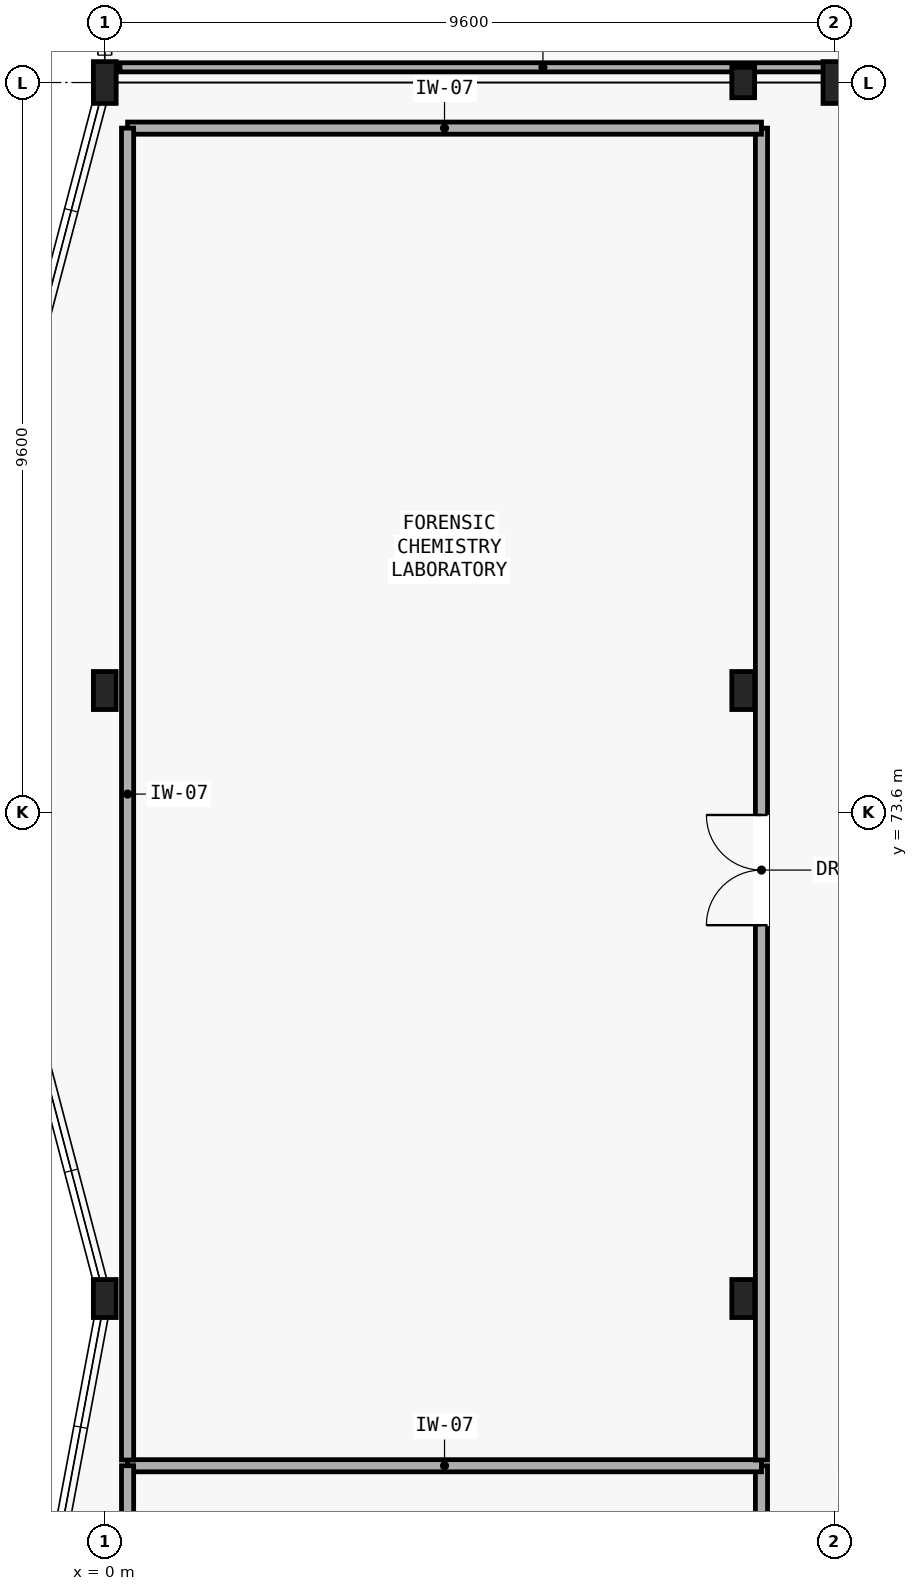
"""IFC4 building model, lengths in metres.
Left out: names, types, materials, properties, quantities, classifications, styles, units other than length and angle.
Written with IfcOpenShell. Run it as: python <this file> out.ifc"""

import sys

from ifc_helpers import new_model, si_unit, direction, frame, frame_2d, origin, origin_2d, place, context, subcontext, project, spatial, rectangle, i_section, extrude, element, fill, save


model = new_model("IFC4")
c1 = context("Model", 3, precision=1e-05, world=origin(), true_north=direction((0.0, 1.0)))
c2 = subcontext(c1, "Body", "Model", "MODEL_VIEW")
j1 = project(units=[si_unit("LENGTHUNIT", "METRE"), si_unit("PLANEANGLEUNIT", "RADIAN")], contexts=[c1])
p1 = place(None, origin())
s1 = spatial("IfcSite", under=j1, at=p1, CompositionType="ELEMENT")
p2 = place(p1, origin())
s2 = spatial("IfcBuilding", under=s1, at=p2, CompositionType="ELEMENT")
p3 = place(p2, frame((0.0, 0.0, 9.45)))
s3 = spatial("IfcBuildingStorey", under=s2, at=p3, CompositionType="ELEMENT", Elevation=9.45)
for number, where, z_axis, x_axis in (
    (1, (0.0, 83.2, 0.0), (0.0, 0.0, 1.0), (1.0, 0.0, 0.0)),
    (2, (9.6, 83.2, 0.0), (0.0, 0.0, 1.0), (1.0, 0.0, 0.0)),
):
    element("IfcColumn", number, at=place(p3, frame(where, z_axis=z_axis, x_axis=x_axis)), inside=s3, PredefinedType="COLUMN", context=c2, shape_type="SweptSolid", body=[
        extrude(i_section(OverallWidth=0.3, OverallDepth=0.55, WebThickness=0.015, FlangeThickness=0.029, FilletRadius=0.027, at=origin_2d()), origin(), (0.0, 0.0, 1.0), 4.2),
    ])
for number, where, z_axis, x_axis in (
    (3, (0.0, 67.2, 0.0), (0.0, 0.0, 1.0), (1.0, 0.0, 0.0)),
    (4, (8.4, 67.2, 0.0), (0.0, 0.0, 1.0), (1.0, 0.0, 0.0)),
    (5, (0.0, 75.2, 0.0), (0.0, 0.0, 1.0), (1.0, 0.0, 0.0)),
    (6, (8.4, 75.2, 0.0), (0.0, 0.0, 1.0), (1.0, 0.0, 0.0)),
):
    element("IfcColumn", number, at=place(p3, frame(where, z_axis=z_axis, x_axis=x_axis)), inside=s3, PredefinedType="COLUMN", context=c2, shape_type="SweptSolid", body=[
        extrude(i_section(OverallWidth=0.3, OverallDepth=0.5, WebThickness=0.014, FlangeThickness=0.028, FilletRadius=0.027, at=origin_2d()), origin(), (0.0, 0.0, 1.0), 4.2),
    ])
p4 = place(p3, frame((8.4, 83.2, 0.0), z_axis=(0.0, 0.0, 1.0), x_axis=(1.0, 0.0, 0.0)))
e7 = element("IfcColumn", 7, at=p4, inside=s3, PredefinedType="COLUMN", context=c2, shape_type="SweptSolid", body=[
    extrude(i_section(OverallWidth=0.3, OverallDepth=0.4, WebThickness=0.013, FlangeThickness=0.024, FilletRadius=0.027, at=origin_2d()), origin(), (0.0, 0.0, 1.0), 4.2),
])
p5 = place(p3, frame((0.2, 83.4, 0.0), z_axis=(0.0, 0.0, 1.0), x_axis=(1.0, 0.0, 0.0)))
e8 = element("IfcWall", 8, at=p5, inside=s3, PredefinedType="PARTITIONING", context=c2, shape_type="SweptSolid", body=[
    extrude(rectangle(XDim=15.9, YDim=0.12, at=frame_2d((7.95, 0.0))), origin(), (0.0, 0.0, 1.0), 3.15),
])
p6 = place(p3, frame((8.64, 48.25, 0.0), z_axis=(0.0, 0.0, 1.0), x_axis=(0.0, 1.0, 0.0)))
e9 = element("IfcWall", 9, at=p6, inside=s3, PredefinedType="PARTITIONING", context=c2, shape_type="SweptSolid", body=[
    extrude(rectangle(XDim=16.75, YDim=0.16, at=frame_2d((8.375, 0.0))), origin(), (0.0, 0.0, 1.0), 3.51),
])
p7 = place(p6, frame((6.4, 0.0, 0.0)))
e10 = element("IfcOpeningElement", 10, at=p7, cuts=e9, PredefinedType="OPENING", context=c2, shape_type="SweptSolid", body=[
    extrude(rectangle(XDim=1.45, YDim=2.15, at=frame_2d((0.725, 1.075))), frame((0.0, 0.09, 0.0), z_axis=(0.0, -1.0, 0.0), x_axis=(1.0, 0.0, 0.0)), (0.0, 0.0, 1.0), 0.18),
])
p8 = place(p3, frame((8.64, 65.0, 0.0), z_axis=(0.0, 0.0, 1.0), x_axis=(-1.0, 0.0, 0.0)))
e11 = element("IfcWall", 11, at=p8, inside=s3, PredefinedType="PARTITIONING", context=c2, shape_type="SweptSolid", body=[
    extrude(rectangle(XDim=8.34, YDim=0.16, at=frame_2d((4.17, 0.0))), origin(), (0.0, 0.0, 1.0), 3.97),
])
p9 = place(p3, frame((0.3, 65.0, 0.0), z_axis=(0.0, 0.0, 1.0), x_axis=(0.0, -1.0, 0.0)))
e12 = element("IfcWall", 12, at=p9, inside=s3, PredefinedType="PARTITIONING", context=c2, shape_type="SweptSolid", body=[
    extrude(rectangle(XDim=16.75, YDim=0.16, at=frame_2d((8.375, 0.0))), origin(), (0.0, 0.0, 1.0), 3.51),
])
p10 = place(p3, frame((8.64, 65.075, 0.0), z_axis=(0.0, 0.0, 1.0), x_axis=(0.0, 1.0, 0.0)))
e13 = element("IfcWall", 13, at=p10, inside=s3, PredefinedType="PARTITIONING", context=c2, shape_type="SweptSolid", body=[
    extrude(rectangle(XDim=17.525, YDim=0.16, at=frame_2d((8.763, 0.0))), origin(), (0.0, 0.0, 1.0), 3.51),
])
p11 = place(p10, frame((7.038, 0.0, 0.0)))
e14 = element("IfcOpeningElement", 14, at=p11, cuts=e13, PredefinedType="OPENING", context=c2, shape_type="SweptSolid", body=[
    extrude(rectangle(XDim=1.45, YDim=2.15, at=frame_2d((0.725, 1.075))), frame((0.0, 0.09, 0.0), z_axis=(0.0, -1.0, 0.0), x_axis=(1.0, 0.0, 0.0)), (0.0, 0.0, 1.0), 0.18),
])
p12 = place(p3, frame((8.64, 82.6, 0.0), z_axis=(0.0, 0.0, 1.0), x_axis=(-1.0, 0.0, 0.0)))
e15 = element("IfcWall", 15, at=p12, inside=s3, PredefinedType="PARTITIONING", context=c2, shape_type="SweptSolid", body=[
    extrude(rectangle(XDim=8.34, YDim=0.16, at=frame_2d((4.17, 0.0))), origin(), (0.0, 0.0, 1.0), 3.97),
])
p13 = place(p3, frame((0.3, 82.6, 0.0), z_axis=(0.0, 0.0, 1.0), x_axis=(0.0, -1.0, 0.0)))
e16 = element("IfcWall", 16, at=p13, inside=s3, PredefinedType="PARTITIONING", context=c2, shape_type="SweptSolid", body=[
    extrude(rectangle(XDim=17.525, YDim=0.16, at=frame_2d((8.763, 0.0))), origin(), (0.0, 0.0, 1.0), 3.51),
])
p14 = place(p11, origin())
e17 = element("IfcDoor", 17, at=p14, inside=s3, OperationType="DOUBLE_DOOR_SINGLE_SWING", PredefinedType="DOOR", context=c2, shape_type="SweptSolid", body=[
    extrude(rectangle(XDim=1.45, YDim=2.15, at=frame_2d((0.725, 1.075))), frame((0.0, 0.025, 0.0), z_axis=(0.0, -1.0, 0.0), x_axis=(1.0, 0.0, 0.0)), (0.0, 0.0, 1.0), 0.05),
])
fill(e14, e17)
save(model, sys.argv[1])
